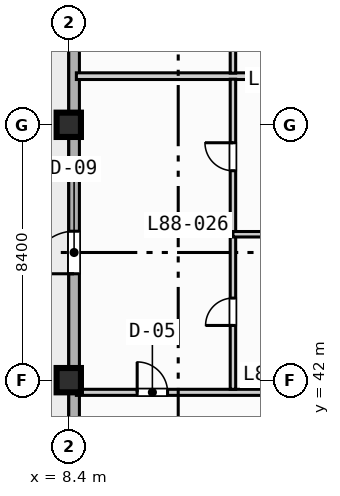
"""IFC4 building model, lengths in metres.
Left out: names, types, materials, properties, quantities, classifications, styles, units other than length and angle.
Written with IfcOpenShell. Run it as: python <this file> out.ifc"""

import sys

from ifc_helpers import new_model, si_unit, direction, frame, frame_2d, origin, origin_2d, place, context, subcontext, project, spatial, rectangle, extrude, element, fill, save


model = new_model("IFC4")
c1 = context("Model", 3, precision=1e-05, world=origin(), true_north=direction((0.0, 1.0)))
c2 = subcontext(c1, "Body", "Model", "MODEL_VIEW")
j1 = project(units=[si_unit("LENGTHUNIT", "METRE"), si_unit("PLANEANGLEUNIT", "RADIAN")], contexts=[c1])
p1 = place(None, origin())
s1 = spatial("IfcSite", under=j1, at=p1, CompositionType="ELEMENT")
p2 = place(p1, origin())
s2 = spatial("IfcBuilding", under=s1, at=p2, CompositionType="ELEMENT")
p3 = place(p2, frame((0.0, 0.0, 355.4)))
s3 = spatial("IfcBuildingStorey", under=s2, at=p3, CompositionType="ELEMENT", Elevation=355.4)
for number, where, z_axis, x_axis in (
    (1, (8.4, 42.0, 0.0), (0.0, 0.0, 1.0), (1.0, 0.0, 0.0)),
    (2, (8.4, 50.4, 0.0), (0.0, 0.0, 1.0), (1.0, 0.0, 0.0)),
):
    element("IfcColumn", number, at=place(p3, frame(where, z_axis=z_axis, x_axis=x_axis)), inside=s3, PredefinedType="COLUMN", context=c2, shape_type="SweptSolid", body=[
        extrude(rectangle(XDim=0.8, YDim=0.8, at=origin_2d()), origin(), (0.0, 0.0, 1.0), 4.2),
    ])
p4 = place(p3, frame((8.575, 11.575, 0.0), z_axis=(0.0, 0.0, 1.0), x_axis=(0.0, 1.0, 0.0)))
e3 = element("IfcWall", 3, at=p4, inside=s3, PredefinedType="STANDARD", context=c2, shape_type="SweptSolid", body=[
    extrude(rectangle(XDim=60.85, YDim=0.35, at=frame_2d((30.425, 0.0))), origin(), (0.0, 0.0, 1.0), 3.97),
])
p5 = place(p4, frame((33.925, 0.0, 0.0)))
e4 = element("IfcOpeningElement", 4, at=p5, cuts=e3, PredefinedType="OPENING", context=c2, shape_type="SweptSolid", body=[
    extrude(rectangle(XDim=1.4, YDim=2.2, at=frame_2d((0.7, 1.1))), frame((0.0, 0.185, 0.0), z_axis=(0.0, -1.0, 0.0), x_axis=(1.0, 0.0, 0.0)), (0.0, 0.0, 1.0), 0.37),
])
p6 = place(p4, frame((24.825, 0.0, 0.85)))
e5 = element("IfcOpeningElement", 5, at=p6, cuts=e3, PredefinedType="OPENING", context=c2, shape_type="SweptSolid", body=[
    extrude(rectangle(XDim=2.8, YDim=2.1, at=frame_2d((1.4, 1.05))), frame((0.0, 0.185, 0.0), z_axis=(0.0, -1.0, 0.0), x_axis=(1.0, 0.0, 0.0)), (0.0, 0.0, 1.0), 0.37),
])
p7 = place(p4, frame((41.625, 0.0, 0.85)))
e6 = element("IfcOpeningElement", 6, at=p7, cuts=e3, PredefinedType="OPENING", context=c2, shape_type="SweptSolid", body=[
    extrude(rectangle(XDim=2.8, YDim=2.1, at=frame_2d((1.4, 1.05))), frame((0.0, 0.185, 0.0), z_axis=(0.0, -1.0, 0.0), x_axis=(1.0, 0.0, 0.0)), (0.0, 0.0, 1.0), 0.37),
])
p8 = place(p4, frame((19.25, 0.0, 0.85)))
e7 = element("IfcOpeningElement", 7, at=p8, cuts=e3, PredefinedType="OPENING", context=c2, shape_type="SweptSolid", body=[
    extrude(rectangle(XDim=1.8, YDim=1.8, at=frame_2d((0.9, 0.9))), frame((0.0, 0.185, 0.0), z_axis=(0.0, -1.0, 0.0), x_axis=(1.0, 0.0, 0.0)), (0.0, 0.0, 1.0), 0.37),
])
p9 = place(p3, frame((8.65, 41.6, 0.0), z_axis=(0.0, 0.0, 1.0), x_axis=(1.0, 0.0, 0.0)))
e8 = element("IfcWall", 8, at=p9, inside=s3, PredefinedType="PARTITIONING", context=c2, shape_type="SweptSolid", body=[
    extrude(rectangle(XDim=7.95, YDim=0.2, at=frame_2d((3.975, 0.0))), origin(), (0.0, 0.0, 1.0), 3.97),
])
p10 = place(p9, frame((2.0, 0.0, 0.0)))
e9 = element("IfcOpeningElement", 9, at=p10, cuts=e8, PredefinedType="OPENING", context=c2, shape_type="SweptSolid", body=[
    extrude(rectangle(XDim=1.0, YDim=2.15, at=frame_2d((0.5, 1.075))), frame((0.0, 0.11, 0.0), z_axis=(0.0, -1.0, 0.0), x_axis=(1.0, 0.0, 0.0)), (0.0, 0.0, 1.0), 0.22),
])
p11 = place(p3, frame((8.65, 52.0, 0.0), z_axis=(0.0, 0.0, 1.0), x_axis=(1.0, 0.0, 0.0)))
e10 = element("IfcWall", 10, at=p11, inside=s3, PredefinedType="PARTITIONING", context=c2, shape_type="SweptSolid", body=[
    extrude(rectangle(XDim=7.95, YDim=0.22, at=frame_2d((3.975, 0.0))), origin(), (0.0, 0.0, 1.0), 3.97),
])
p12 = place(p3, frame((13.8, 41.7, 0.0), z_axis=(0.0, 0.0, 1.0), x_axis=(0.0, 1.0, 0.0)))
e11 = element("IfcWall", 11, at=p12, inside=s3, PredefinedType="PLUMBINGWALL", context=c2, shape_type="SweptSolid", body=[
    extrude(rectangle(XDim=10.2, YDim=0.18, at=frame_2d((5.1, 0.0))), origin(), (0.0, 0.0, 1.0), 3.97),
])
p13 = place(p12, frame((2.1, 0.0, 0.0)))
e12 = element("IfcOpeningElement", 12, at=p13, cuts=e11, PredefinedType="OPENING", context=c2, shape_type="SweptSolid", body=[
    extrude(rectangle(XDim=0.9, YDim=2.1, at=frame_2d((0.45, 1.05))), frame((0.0, 0.1, 0.0), z_axis=(0.0, -1.0, 0.0), x_axis=(1.0, 0.0, 0.0)), (0.0, 0.0, 1.0), 0.2),
])
p14 = place(p12, frame((7.19, 0.0, 0.0)))
e13 = element("IfcOpeningElement", 13, at=p14, cuts=e11, PredefinedType="OPENING", context=c2, shape_type="SweptSolid", body=[
    extrude(rectangle(XDim=0.92, YDim=2.1, at=frame_2d((0.46, 1.05))), frame((0.0, 0.1, 0.0), z_axis=(0.0, -1.0, 0.0), x_axis=(1.0, 0.0, 0.0)), (0.0, 0.0, 1.0), 0.2),
])
p15 = place(p3, frame((13.8, 46.8, 0.0), z_axis=(0.0, 0.0, 1.0), x_axis=(1.0, 0.0, 0.0)))
e14 = element("IfcWall", 14, at=p15, inside=s3, PredefinedType="PLUMBINGWALL", context=c2, shape_type="SweptSolid", body=[
    extrude(rectangle(XDim=2.8, YDim=0.18, at=frame_2d((1.4, 0.0))), origin(), (0.0, 0.0, 1.0), 3.97),
])
p16 = place(p3, frame((13.8, 52.1, 0.0), z_axis=(0.0, 0.0, 1.0), x_axis=(0.0, 1.0, 0.0)))
e15 = element("IfcWall", 15, at=p16, inside=s3, PredefinedType="PLUMBINGWALL", context=c2, shape_type="SweptSolid", body=[
    extrude(rectangle(XDim=6.8, YDim=0.18, at=frame_2d((3.4, 0.0))), origin(), (0.0, 0.0, 1.0), 3.97),
])
p17 = place(p16, frame((1.25, 0.0, 0.0)))
e16 = element("IfcOpeningElement", 16, at=p17, cuts=e15, PredefinedType="OPENING", context=c2, shape_type="SweptSolid", body=[
    extrude(rectangle(XDim=0.9, YDim=2.1, at=frame_2d((0.45, 1.05))), frame((0.0, 0.1, 0.0), z_axis=(0.0, -1.0, 0.0), x_axis=(1.0, 0.0, 0.0)), (0.0, 0.0, 1.0), 0.2),
])
p18 = place(p16, frame((4.64, 0.0, 0.0)))
e17 = element("IfcOpeningElement", 17, at=p18, cuts=e15, PredefinedType="OPENING", context=c2, shape_type="SweptSolid", body=[
    extrude(rectangle(XDim=0.92, YDim=2.1, at=frame_2d((0.46, 1.05))), frame((0.0, 0.1, 0.0), z_axis=(0.0, -1.0, 0.0), x_axis=(1.0, 0.0, 0.0)), (0.0, 0.0, 1.0), 0.2),
])
p19 = place(p5, origin())
e18 = element("IfcDoor", 18, at=p19, inside=s3, OperationType="SINGLE_SWING_LEFT", PredefinedType="DOOR", context=c2, shape_type="SweptSolid", body=[
    extrude(rectangle(XDim=1.4, YDim=2.2, at=frame_2d((0.7, 1.1))), frame((0.0, 0.025, 0.0), z_axis=(0.0, -1.0, 0.0), x_axis=(1.0, 0.0, 0.0)), (0.0, 0.0, 1.0), 0.05),
])
fill(e4, e18)
p20 = place(p10, origin())
e19 = element("IfcDoor", 19, at=p20, inside=s3, OperationType="SINGLE_SWING_LEFT", PredefinedType="DOOR", context=c2, shape_type="SweptSolid", body=[
    extrude(rectangle(XDim=1.0, YDim=2.15, at=frame_2d((0.5, 1.075))), frame((0.0, 0.025, 0.0), z_axis=(0.0, -1.0, 0.0), x_axis=(1.0, 0.0, 0.0)), (0.0, 0.0, 1.0), 0.05),
])
fill(e9, e19)
p21 = place(p13, origin())
e20 = element("IfcDoor", 20, at=p21, inside=s3, OperationType="SINGLE_SWING_LEFT", PredefinedType="DOOR", context=c2, shape_type="SweptSolid", body=[
    extrude(rectangle(XDim=0.9, YDim=2.1, at=frame_2d((0.45, 1.05))), frame((0.0, 0.025, 0.0), z_axis=(0.0, -1.0, 0.0), x_axis=(1.0, 0.0, 0.0)), (0.0, 0.0, 1.0), 0.05),
])
fill(e12, e20)
p22 = place(p14, origin())
e21 = element("IfcDoor", 21, at=p22, inside=s3, OperationType="SINGLE_SWING_RIGHT", PredefinedType="DOOR", context=c2, shape_type="SweptSolid", body=[
    extrude(rectangle(XDim=0.92, YDim=2.1, at=frame_2d((0.46, 1.05))), frame((0.0, 0.025, 0.0), z_axis=(0.0, -1.0, 0.0), x_axis=(1.0, 0.0, 0.0)), (0.0, 0.0, 1.0), 0.05),
])
fill(e13, e21)
save(model, sys.argv[1])
